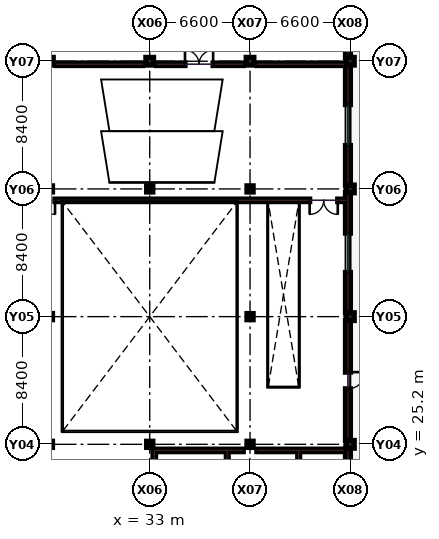
"""IFC4 building model, lengths in metres.
Left out: names, types, materials, properties, quantities, classifications, styles, units other than length and angle.
Written with IfcOpenShell. Run it as: python <this file> out.ifc"""

import sys

from ifc_helpers import new_model, si_unit, direction, frame, frame_2d, origin, origin_2d, place, context, subcontext, project, spatial, rectangle, extrude, element, fill, save


model = new_model("IFC4")
c1 = context("Model", 3, precision=1e-05, world=origin(), true_north=direction((0.0, 1.0)))
c2 = subcontext(c1, "Body", "Model", "MODEL_VIEW")
j1 = project(units=[si_unit("LENGTHUNIT", "METRE"), si_unit("PLANEANGLEUNIT", "RADIAN")], contexts=[c1])
p1 = place(None, origin())
s1 = spatial("IfcSite", under=j1, at=p1, CompositionType="ELEMENT")
p2 = place(p1, origin())
s2 = spatial("IfcBuilding", under=s1, at=p2, CompositionType="ELEMENT")
p3 = place(p2, frame((0.0, 0.0, 5.4)))
s3 = spatial("IfcBuildingStorey", under=s2, at=p3, CompositionType="ELEMENT", Elevation=5.4)
p4 = place(p3, frame((26.4, 50.4, 0.0), z_axis=(0.0, 0.0, 1.0), x_axis=(1.0, 0.0, 0.0)))
e1 = element("IfcColumn", 1, at=p4, inside=s3, PredefinedType="COLUMN", context=c2, shape_type="SweptSolid", body=[
    extrude(rectangle(XDim=0.5, YDim=0.5, at=origin_2d()), origin(), (0.0, 0.0, 1.0), 4.5),
])
for number, where, z_axis, x_axis in (
    (2, (33.0, 25.2, 0.0), (0.0, 0.0, 1.0), (1.0, 0.0, 0.0)),
    (3, (33.0, 42.0, 0.0), (0.0, 0.0, 1.0), (1.0, 0.0, 0.0)),
):
    element("IfcColumn", number, at=place(p3, frame(where, z_axis=z_axis, x_axis=x_axis)), inside=s3, PredefinedType="COLUMN", context=c2, shape_type="SweptSolid", body=[
        extrude(rectangle(XDim=0.4, YDim=0.4, at=origin_2d()), origin(), (0.0, 0.0, 1.0), 4.5),
    ])
p5 = place(p3, frame((33.0, 50.4, 0.0), z_axis=(0.0, 0.0, 1.0), x_axis=(1.0, 0.0, 0.0)))
e4 = element("IfcColumn", 4, at=p5, inside=s3, PredefinedType="COLUMN", context=c2, shape_type="SweptSolid", body=[
    extrude(rectangle(XDim=0.5, YDim=0.5, at=origin_2d()), origin(), (0.0, 0.0, 1.0), 4.5),
])
for number, where, z_axis, x_axis in (
    (5, (39.6, 25.2, 0.0), (0.0, 0.0, 1.0), (1.0, 0.0, 0.0)),
    (6, (39.6, 33.6, 0.0), (0.0, 0.0, 1.0), (1.0, 0.0, 0.0)),
    (7, (39.6, 42.0, 0.0), (0.0, 0.0, 1.0), (1.0, 0.0, 0.0)),
):
    element("IfcColumn", number, at=place(p3, frame(where, z_axis=z_axis, x_axis=x_axis)), inside=s3, PredefinedType="COLUMN", context=c2, shape_type="SweptSolid", body=[
        extrude(rectangle(XDim=0.4, YDim=0.4, at=origin_2d()), origin(), (0.0, 0.0, 1.0), 4.5),
    ])
for number, where, z_axis, x_axis in (
    (8, (39.6, 50.4, 0.0), (0.0, 0.0, 1.0), (1.0, 0.0, 0.0)),
    (9, (46.2, 25.2, 0.0), (0.0, 0.0, 1.0), (1.0, 0.0, 0.0)),
    (10, (46.2, 33.6, 0.0), (0.0, 0.0, 1.0), (1.0, 0.0, 0.0)),
    (11, (46.2, 42.0, 0.0), (0.0, 0.0, 1.0), (1.0, 0.0, 0.0)),
    (12, (46.2, 50.4, 0.0), (0.0, 0.0, 1.0), (1.0, 0.0, 0.0)),
):
    element("IfcColumn", number, at=place(p3, frame(where, z_axis=z_axis, x_axis=x_axis)), inside=s3, PredefinedType="COLUMN", context=c2, shape_type="SweptSolid", body=[
        extrude(rectangle(XDim=0.5, YDim=0.5, at=origin_2d()), origin(), (0.0, 0.0, 1.0), 4.5),
    ])
p6 = place(p3, frame((33.3, 24.8, 0.0), z_axis=(0.0, 0.0, 1.0), x_axis=(1.0, 0.0, 0.0)))
e13 = element("IfcWall", 13, at=p6, inside=s3, PredefinedType="PARTITIONING", context=c2, shape_type="SweptSolid", body=[
    extrude(rectangle(XDim=5.85, YDim=0.16, at=frame_2d((2.925, 0.0))), origin(), (0.0, 0.0, 1.0), 3.45),
])
p7 = place(p3, frame((40.05, 24.8, 0.0), z_axis=(0.0, 0.0, 1.0), x_axis=(1.0, 0.0, 0.0)))
e14 = element("IfcWall", 14, at=p7, inside=s3, PredefinedType="PARTITIONING", context=c2, shape_type="SweptSolid", body=[
    extrude(rectangle(XDim=5.9, YDim=0.16, at=frame_2d((2.95, 0.0))), origin(), (0.0, 0.0, 1.0), 3.45),
])
p8 = place(p3, frame((33.3, 19.8, 0.0), z_axis=(0.0, 0.0, 1.0), x_axis=(0.0, 1.0, 0.0)))
e15 = element("IfcWall", 15, at=p8, inside=s3, PredefinedType="PARTITIONING", context=c2, shape_type="SweptSolid", body=[
    extrude(rectangle(XDim=5.0, YDim=0.16, at=frame_2d((2.5, 0.0))), origin(), (0.0, 0.0, 1.0), 3.45),
])
for number, where, z_axis, x_axis in (
    (16, (38.1, 19.8, 0.0), (0.0, 0.0, 1.0), (0.0, 1.0, 0.0)),
    (17, (42.8, 19.8, 0.0), (0.0, 0.0, 1.0), (0.0, 1.0, 0.0)),
):
    element("IfcWall", number, at=place(p3, frame(where, z_axis=z_axis, x_axis=x_axis)), inside=s3, PredefinedType="PARTITIONING", context=c2, shape_type="SweptSolid", body=[
        extrude(rectangle(XDim=5.0, YDim=0.12, at=frame_2d((2.5, 0.0))), origin(), (0.0, 0.0, 1.0), 3.45),
    ])
p9 = place(p3, frame((0.32, 41.25, 0.0), z_axis=(0.0, 0.0, 1.0), x_axis=(1.0, 0.0, 0.0)))
e18 = element("IfcWall", 18, at=p9, inside=s3, PredefinedType="PARTITIONING", context=c2, shape_type="SweptSolid", body=[
    extrude(rectangle(XDim=45.63, YDim=0.16, at=frame_2d((22.815, 0.0))), origin(), (0.0, 0.0, 1.0), 3.45),
])
p10 = place(p9, frame((1.9, 0.0, 0.0)))
e19 = element("IfcOpeningElement", 19, at=p10, cuts=e18, PredefinedType="OPENING", context=c2, shape_type="SweptSolid", body=[
    extrude(rectangle(XDim=1.85, YDim=2.25, at=frame_2d((0.925, 1.125))), frame((0.0, 0.09, 0.0), z_axis=(0.0, -1.0, 0.0), x_axis=(1.0, 0.0, 0.0)), (0.0, 0.0, 1.0), 0.18),
])
p11 = place(p9, frame((24.6, 0.0, 0.0)))
e20 = element("IfcOpeningElement", 20, at=p11, cuts=e18, PredefinedType="OPENING", context=c2, shape_type="SweptSolid", body=[
    extrude(rectangle(XDim=1.85, YDim=2.25, at=frame_2d((0.925, 1.125))), frame((0.0, 0.09, 0.0), z_axis=(0.0, -1.0, 0.0), x_axis=(1.0, 0.0, 0.0)), (0.0, 0.0, 1.0), 0.18),
])
p12 = place(p9, frame((43.2, 0.0, 0.0)))
e21 = element("IfcOpeningElement", 21, at=p12, cuts=e18, PredefinedType="OPENING", context=c2, shape_type="SweptSolid", body=[
    extrude(rectangle(XDim=1.85, YDim=2.25, at=frame_2d((0.925, 1.125))), frame((0.0, 0.09, 0.0), z_axis=(0.0, -1.0, 0.0), x_axis=(1.0, 0.0, 0.0)), (0.0, 0.0, 1.0), 0.18),
])
p13 = place(p3, frame((26.85, 50.2, 0.0), z_axis=(0.0, 0.0, 1.0), x_axis=(1.0, 0.0, 0.0)))
e22 = element("IfcWall", 22, at=p13, inside=s3, PredefinedType="PARTITIONING", context=c2, shape_type="SweptSolid", body=[
    extrude(rectangle(XDim=5.7, YDim=0.16, at=frame_2d((2.85, 0.0))), origin(), (0.0, 0.0, 1.0), 3.45),
])
p14 = place(p3, frame((33.45, 50.2, 0.0), z_axis=(0.0, 0.0, 1.0), x_axis=(1.0, 0.0, 0.0)))
e23 = element("IfcWall", 23, at=p14, inside=s3, PredefinedType="PARTITIONING", context=c2, shape_type="SweptSolid", body=[
    extrude(rectangle(XDim=5.7, YDim=0.16, at=frame_2d((2.85, 0.0))), origin(), (0.0, 0.0, 1.0), 3.45),
])
p15 = place(p14, frame((1.87, 0.0, 0.0)))
e24 = element("IfcOpeningElement", 24, at=p15, cuts=e23, PredefinedType="OPENING", context=c2, shape_type="SweptSolid", body=[
    extrude(rectangle(XDim=1.85, YDim=2.25, at=frame_2d((0.925, 1.125))), frame((0.0, 0.09, 0.0), z_axis=(0.0, -1.0, 0.0), x_axis=(1.0, 0.0, 0.0)), (0.0, 0.0, 1.0), 0.18),
])
p16 = place(p3, frame((40.05, 50.2, 0.0), z_axis=(0.0, 0.0, 1.0), x_axis=(1.0, 0.0, 0.0)))
e25 = element("IfcWall", 25, at=p16, inside=s3, PredefinedType="PARTITIONING", context=c2, shape_type="SweptSolid", body=[
    extrude(rectangle(XDim=5.9, YDim=0.16, at=frame_2d((2.95, 0.0))), origin(), (0.0, 0.0, 1.0), 3.45),
])
p17 = place(p3, frame((46.04, 17.045, 0.0), z_axis=(0.0, 0.0, 1.0), x_axis=(0.0, 1.0, 0.0)))
e26 = element("IfcWall", 26, at=p17, inside=s3, PredefinedType="SOLIDWALL", context=c2, shape_type="SweptSolid", body=[
    extrude(rectangle(XDim=7.91, YDim=0.32, at=frame_2d((3.955, 0.0))), origin(), (0.0, 0.0, 1.0), 3.485),
])
p18 = place(p17, frame((3.005, 0.0, 0.95)))
e27 = element("IfcOpeningElement", 27, at=p18, cuts=e26, PredefinedType="OPENING", context=c2, shape_type="SweptSolid", body=[
    extrude(rectangle(XDim=1.9, YDim=1.85, at=frame_2d((0.95, 0.925))), frame((0.0, 0.17, 0.0), z_axis=(0.0, -1.0, 0.0), x_axis=(1.0, 0.0, 0.0)), (0.0, 0.0, 1.0), 0.34),
])
p19 = place(p3, frame((46.04, 25.445, 0.0), z_axis=(0.0, 0.0, 1.0), x_axis=(0.0, 1.0, 0.0)))
e28 = element("IfcWall", 28, at=p19, inside=s3, PredefinedType="SOLIDWALL", context=c2, shape_type="SweptSolid", body=[
    extrude(rectangle(XDim=7.91, YDim=0.32, at=frame_2d((3.955, 0.0))), origin(), (0.0, 0.0, 1.0), 3.635),
])
p20 = place(p19, frame((3.405, 0.0, 0.0)))
e29 = element("IfcOpeningElement", 29, at=p20, cuts=e28, PredefinedType="OPENING", context=c2, shape_type="SweptSolid", body=[
    extrude(rectangle(XDim=1.1, YDim=2.2, at=frame_2d((0.55, 1.1))), frame((0.0, 0.17, 0.0), z_axis=(0.0, -1.0, 0.0), x_axis=(1.0, 0.0, 0.0)), (0.0, 0.0, 1.0), 0.34),
])
p21 = place(p3, frame((46.04, 33.845, 0.0), z_axis=(0.0, 0.0, 1.0), x_axis=(0.0, 1.0, 0.0)))
e30 = element("IfcWall", 30, at=p21, inside=s3, PredefinedType="SOLIDWALL", context=c2, shape_type="SweptSolid", body=[
    extrude(rectangle(XDim=7.91, YDim=0.32, at=frame_2d((3.955, 0.0))), origin(), (0.0, 0.0, 1.0), 3.485),
])
p22 = place(p21, frame((2.655, 0.0, 0.95)))
e31 = element("IfcOpeningElement", 31, at=p22, cuts=e30, PredefinedType="OPENING", context=c2, shape_type="SweptSolid", body=[
    extrude(rectangle(XDim=2.6, YDim=1.9, at=frame_2d((1.3, 0.95))), frame((0.0, 0.17, 0.0), z_axis=(0.0, -1.0, 0.0), x_axis=(1.0, 0.0, 0.0)), (0.0, 0.0, 1.0), 0.34),
])
p23 = place(p3, frame((46.04, 42.245, 0.0), z_axis=(0.0, 0.0, 1.0), x_axis=(0.0, 1.0, 0.0)))
e32 = element("IfcWall", 32, at=p23, inside=s3, PredefinedType="SOLIDWALL", context=c2, shape_type="SweptSolid", body=[
    extrude(rectangle(XDim=7.91, YDim=0.32, at=frame_2d((3.955, 0.0))), origin(), (0.0, 0.0, 1.0), 3.635),
])
p24 = place(p23, frame((2.605, 0.0, 0.95)))
e33 = element("IfcOpeningElement", 33, at=p24, cuts=e32, PredefinedType="OPENING", context=c2, shape_type="SweptSolid", body=[
    extrude(rectangle(XDim=2.7, YDim=2.05, at=frame_2d((1.35, 1.025))), frame((0.0, 0.17, 0.0), z_axis=(0.0, -1.0, 0.0), x_axis=(1.0, 0.0, 0.0)), (0.0, 0.0, 1.0), 0.34),
])
p25 = place(p3, frame((46.04, 50.645, 0.0), z_axis=(0.0, 0.0, 1.0), x_axis=(0.0, 1.0, 0.0)))
e34 = element("IfcWall", 34, at=p25, inside=s3, PredefinedType="SOLIDWALL", context=c2, shape_type="SweptSolid", body=[
    extrude(rectangle(XDim=7.91, YDim=0.32, at=frame_2d((3.955, 0.0))), origin(), (0.0, 0.0, 1.0), 3.485),
])
p26 = place(p25, frame((2.405, 0.0, 0.95)))
e35 = element("IfcOpeningElement", 35, at=p26, cuts=e34, PredefinedType="OPENING", context=c2, shape_type="SweptSolid", body=[
    extrude(rectangle(XDim=3.1, YDim=2.05, at=frame_2d((1.55, 1.025))), frame((0.0, 0.17, 0.0), z_axis=(0.0, -1.0, 0.0), x_axis=(1.0, 0.0, 0.0)), (0.0, 0.0, 1.0), 0.34),
])
p27 = place(p11, frame((1.85, 0.0, 0.0), z_axis=(0.0, 0.0, 1.0), x_axis=(-1.0, 0.0, 0.0)))
e36 = element("IfcDoor", 36, at=p27, inside=s3, OperationType="DOUBLE_DOOR_SINGLE_SWING", PredefinedType="DOOR", context=c2, shape_type="SweptSolid", body=[
    extrude(rectangle(XDim=1.85, YDim=2.25, at=frame_2d((0.925, 1.125))), frame((0.0, 0.025, 0.0), z_axis=(0.0, -1.0, 0.0), x_axis=(1.0, 0.0, 0.0)), (0.0, 0.0, 1.0), 0.05),
])
fill(e20, e36)
p28 = place(p12, frame((1.85, 0.0, 0.0), z_axis=(0.0, 0.0, 1.0), x_axis=(-1.0, 0.0, 0.0)))
e37 = element("IfcDoor", 37, at=p28, inside=s3, OperationType="DOUBLE_DOOR_SINGLE_SWING", PredefinedType="DOOR", context=c2, shape_type="SweptSolid", body=[
    extrude(rectangle(XDim=1.85, YDim=2.25, at=frame_2d((0.925, 1.125))), frame((0.0, 0.025, 0.0), z_axis=(0.0, -1.0, 0.0), x_axis=(1.0, 0.0, 0.0)), (0.0, 0.0, 1.0), 0.05),
])
fill(e21, e37)
p29 = place(p15, origin())
e38 = element("IfcDoor", 38, at=p29, inside=s3, OperationType="DOUBLE_DOOR_SINGLE_SWING", PredefinedType="DOOR", context=c2, shape_type="SweptSolid", body=[
    extrude(rectangle(XDim=1.85, YDim=2.25, at=frame_2d((0.925, 1.125))), frame((0.0, 0.025, 0.0), z_axis=(0.0, -1.0, 0.0), x_axis=(1.0, 0.0, 0.0)), (0.0, 0.0, 1.0), 0.05),
])
fill(e24, e38)
p30 = place(p20, frame((1.1, 0.0, 0.0), z_axis=(0.0, 0.0, 1.0), x_axis=(-1.0, 0.0, 0.0)))
e39 = element("IfcDoor", 39, at=p30, inside=s3, OperationType="SINGLE_SWING_RIGHT", PredefinedType="DOOR", context=c2, shape_type="SweptSolid", body=[
    extrude(rectangle(XDim=1.1, YDim=2.2, at=frame_2d((0.55, 1.1))), frame((0.0, 0.025, 0.0), z_axis=(0.0, -1.0, 0.0), x_axis=(1.0, 0.0, 0.0)), (0.0, 0.0, 1.0), 0.05),
])
fill(e29, e39)
p31 = place(p22, origin())
e40 = element("IfcWindow", 40, at=p31, inside=s3, PartitioningType="SINGLE_PANEL", PredefinedType="WINDOW", context=c2, shape_type="SweptSolid", body=[
    extrude(rectangle(XDim=2.6, YDim=1.9, at=frame_2d((1.3, 0.95))), frame((0.0, 0.03, 0.0), z_axis=(0.0, -1.0, 0.0), x_axis=(1.0, 0.0, 0.0)), (0.0, 0.0, 1.0), 0.06),
])
fill(e31, e40)
p32 = place(p24, origin())
e41 = element("IfcWindow", 41, at=p32, inside=s3, PartitioningType="SINGLE_PANEL", PredefinedType="WINDOW", context=c2, shape_type="SweptSolid", body=[
    extrude(rectangle(XDim=2.7, YDim=2.05, at=frame_2d((1.35, 1.025))), frame((0.0, 0.03, 0.0), z_axis=(0.0, -1.0, 0.0), x_axis=(1.0, 0.0, 0.0)), (0.0, 0.0, 1.0), 0.06),
])
fill(e33, e41)
save(model, sys.argv[1])
